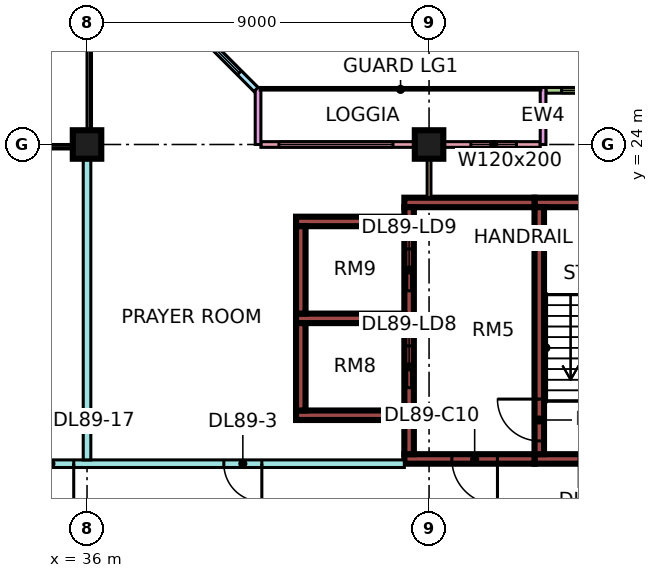
"""IFC4 building model, lengths in metres.
Left out: names, types, materials, properties, quantities, classifications, styles, units other than length and angle.
Written with IfcOpenShell. Run it as: python <this file> out.ifc"""

import sys

from ifc_helpers import new_model, si_unit, direction, frame, frame_2d, origin, origin_2d, place, context, subcontext, project, spatial, rectangle, extrude, element, fill, save


model = new_model("IFC4")
c1 = context("Model", 3, precision=1e-05, world=origin(), true_north=direction((0.0, 1.0)))
c2 = subcontext(c1, "Body", "Model", "MODEL_VIEW")
j1 = project(units=[si_unit("LENGTHUNIT", "METRE"), si_unit("PLANEANGLEUNIT", "RADIAN")], contexts=[c1])
p1 = place(None, origin())
s1 = spatial("IfcSite", under=j1, at=p1, CompositionType="ELEMENT")
p2 = place(p1, origin())
s2 = spatial("IfcBuilding", under=s1, at=p2, CompositionType="ELEMENT")
p3 = place(p2, frame((0.0, 0.0, 380.15)))
s3 = spatial("IfcBuildingStorey", under=s2, at=p3, CompositionType="ELEMENT", Elevation=380.15)
for number, where, z_axis, x_axis in (
    (1, (36.0, 24.0, 0.0), (0.0, 0.0, 1.0), (1.0, 0.0, 0.0)),
    (2, (45.0, 24.0, 0.0), (0.0, 0.0, 1.0), (1.0, 0.0, 0.0)),
):
    element("IfcColumn", number, at=place(p3, frame(where, z_axis=z_axis, x_axis=x_axis)), inside=s3, PredefinedType="COLUMN", context=c2, shape_type="SweptSolid", body=[
        extrude(rectangle(XDim=0.75, YDim=0.75, at=origin_2d()), origin(), (0.0, 0.0, 1.0), 3.75),
    ])
p4 = place(p3, frame((47.775, 15.725, 0.0), z_axis=(0.0, 0.0, 1.0), x_axis=(1.0, 0.0, 0.0)))
e3 = element("IfcWall", 3, at=p4, inside=s3, PredefinedType="SHEAR", context=c2, shape_type="SweptSolid", body=[
    extrude(rectangle(XDim=3.45, YDim=0.25, at=frame_2d((1.725, 0.0))), origin(), (0.0, 0.0, 1.0), 3.75),
])
p5 = place(p4, frame((1.175, 0.0, 0.0)))
e4 = element("IfcOpeningElement", 4, at=p5, cuts=e3, PredefinedType="OPENING", context=c2, shape_type="SweptSolid", body=[
    extrude(rectangle(XDim=1.1, YDim=2.2, at=frame_2d((0.55, 1.1))), frame((0.0, 0.135, 0.0), z_axis=(0.0, -1.0, 0.0), x_axis=(1.0, 0.0, 0.0)), (0.0, 0.0, 1.0), 0.27),
])
p6 = place(p3, frame((47.775, 22.475, 0.0), z_axis=(0.0, 0.0, 1.0), x_axis=(1.0, 0.0, 0.0)))
e5 = element("IfcWall", 5, at=p6, inside=s3, PredefinedType="SHEAR", context=c2, shape_type="SweptSolid", body=[
    extrude(rectangle(XDim=3.45, YDim=0.25, at=frame_2d((1.725, 0.0))), origin(), (0.0, 0.0, 1.0), 3.75),
])
p7 = place(p3, frame((47.9, 15.85, 0.0), z_axis=(0.0, 0.0, 1.0), x_axis=(0.0, 1.0, 0.0)))
e6 = element("IfcWall", 6, at=p7, inside=s3, PredefinedType="SHEAR", context=c2, shape_type="SweptSolid", body=[
    extrude(rectangle(XDim=6.5, YDim=0.25, at=frame_2d((3.25, 0.0))), origin(), (0.0, 0.0, 1.0), 3.75),
])
p8 = place(p7, frame((0.35, 0.0, 0.0)))
e7 = element("IfcOpeningElement", 7, at=p8, cuts=e6, PredefinedType="OPENING", context=c2, shape_type="SweptSolid", body=[
    extrude(rectangle(XDim=1.1, YDim=2.2, at=frame_2d((0.55, 1.1))), frame((0.0, 0.135, 0.0), z_axis=(0.0, -1.0, 0.0), x_axis=(1.0, 0.0, 0.0)), (0.0, 0.0, 1.0), 0.27),
])
p9 = place(p3, frame((44.35, 15.725, 0.0), z_axis=(0.0, 0.0, 1.0), x_axis=(1.0, 0.0, 0.0)))
e8 = element("IfcWall", 8, at=p9, inside=s3, PredefinedType="SHEAR", context=c2, shape_type="SweptSolid", body=[
    extrude(rectangle(XDim=3.425, YDim=0.25, at=frame_2d((1.712, 0.0))), origin(), (0.0, 0.0, 1.0), 3.75),
])
p10 = place(p9, frame((1.25, 0.0, 0.0)))
e9 = element("IfcOpeningElement", 9, at=p10, cuts=e8, PredefinedType="OPENING", context=c2, shape_type="SweptSolid", body=[
    extrude(rectangle(XDim=1.2, YDim=2.2, at=frame_2d((0.6, 1.1))), frame((0.0, 0.135, 0.0), z_axis=(0.0, -1.0, 0.0), x_axis=(1.0, 0.0, 0.0)), (0.0, 0.0, 1.0), 0.27),
])
p11 = place(p3, frame((44.35, 22.475, 0.0), z_axis=(0.0, 0.0, 1.0), x_axis=(1.0, 0.0, 0.0)))
e10 = element("IfcWall", 10, at=p11, inside=s3, PredefinedType="SHEAR", context=c2, shape_type="SweptSolid", body=[
    extrude(rectangle(XDim=3.425, YDim=0.25, at=frame_2d((1.712, 0.0))), origin(), (0.0, 0.0, 1.0), 3.75),
])
p12 = place(p3, frame((44.475, 15.85, 0.0), z_axis=(0.0, 0.0, 1.0), x_axis=(0.0, 1.0, 0.0)))
e11 = element("IfcWall", 11, at=p12, inside=s3, PredefinedType="SHEAR", context=c2, shape_type="SweptSolid", body=[
    extrude(rectangle(XDim=6.5, YDim=0.25, at=frame_2d((3.25, 0.0))), origin(), (0.0, 0.0, 1.0), 3.75),
])
p13 = place(p12, frame((1.75, 0.0, 0.0)))
e12 = element("IfcOpeningElement", 12, at=p13, cuts=e11, PredefinedType="OPENING", context=c2, shape_type="SweptSolid", body=[
    extrude(rectangle(XDim=1.1, YDim=2.2, at=frame_2d((0.55, 1.1))), frame((0.0, 0.135, 0.0), z_axis=(0.0, -1.0, 0.0), x_axis=(1.0, 0.0, 0.0)), (0.0, 0.0, 1.0), 0.27),
])
p14 = place(p12, frame((4.3, 0.0, 0.0)))
e13 = element("IfcOpeningElement", 13, at=p14, cuts=e11, PredefinedType="OPENING", context=c2, shape_type="SweptSolid", body=[
    extrude(rectangle(XDim=1.1, YDim=2.2, at=frame_2d((0.55, 1.1))), frame((0.0, 0.135, 0.0), z_axis=(0.0, -1.0, 0.0), x_axis=(1.0, 0.0, 0.0)), (0.0, 0.0, 1.0), 0.27),
])
for number, where, z_axis, x_axis in (
    (14, (41.5, 16.875, 0.0), (0.0, 0.0, 1.0), (1.0, 0.0, 0.0)),
    (15, (41.5, 19.425, 0.0), (0.0, 0.0, 1.0), (1.0, 0.0, 0.0)),
    (16, (41.5, 21.975, 0.0), (0.0, 0.0, 1.0), (1.0, 0.0, 0.0)),
):
    element("IfcWall", number, at=place(p3, frame(where, z_axis=z_axis, x_axis=x_axis)), inside=s3, PredefinedType="SHEAR", context=c2, shape_type="SweptSolid", body=[
        extrude(rectangle(XDim=2.85, YDim=0.25, at=frame_2d((1.425, 0.0))), origin(), (0.0, 0.0, 1.0), 3.75),
    ])
for number, where, z_axis, x_axis in (
    (17, (41.625, 17.0, 0.0), (0.0, 0.0, 1.0), (0.0, 1.0, 0.0)),
    (18, (41.625, 19.55, 0.0), (0.0, 0.0, 1.0), (0.0, 1.0, 0.0)),
):
    element("IfcWall", number, at=place(p3, frame(where, z_axis=z_axis, x_axis=x_axis)), inside=s3, PredefinedType="SHEAR", context=c2, shape_type="SweptSolid", body=[
        extrude(rectangle(XDim=2.3, YDim=0.25, at=frame_2d((1.15, 0.0))), origin(), (0.0, 0.0, 1.0), 3.75),
    ])
p15 = place(p3, frame((52.5, 25.425, 0.0), z_axis=(0.0, 0.0, 1.0), x_axis=(-1.0, 0.0, 0.0)))
e19 = element("IfcWall", 19, at=p15, inside=s3, PredefinedType="SOLIDWALL", context=c2, shape_type="SweptSolid", body=[
    extrude(rectangle(XDim=4.425, YDim=0.15, at=frame_2d((2.212, 0.0))), origin(), (0.0, 0.0, 1.0), 3.3),
])
p16 = place(p15, frame((0.413, 0.0, 0.45)))
e20 = element("IfcOpeningElement", 20, at=p16, cuts=e19, PredefinedType="OPENING", context=c2, shape_type="SweptSolid", body=[
    extrude(rectangle(XDim=3.6, YDim=2.0, at=frame_2d((1.8, 1.0))), frame((0.0, 0.085, 0.0), z_axis=(0.0, -1.0, 0.0), x_axis=(1.0, 0.0, 0.0)), (0.0, 0.0, 1.0), 0.17),
])
p17 = place(p3, frame((47.925, 24.0, 0.0), z_axis=(0.0, 0.0, 1.0), x_axis=(-1.0, 0.0, 0.0)))
e21 = element("IfcWall", 21, at=p17, inside=s3, PredefinedType="SOLIDWALL", context=c2, shape_type="SweptSolid", body=[
    extrude(rectangle(XDim=7.35, YDim=0.15, at=frame_2d((3.675, 0.0))), origin(), (0.0, 0.0, 1.0), 3.3),
])
p18 = place(p17, frame((0.625, 0.0, 0.45)))
e22 = element("IfcOpeningElement", 22, at=p18, cuts=e21, PredefinedType="OPENING", context=c2, shape_type="SweptSolid", body=[
    extrude(rectangle(XDim=1.2, YDim=2.0, at=frame_2d((0.6, 1.0))), frame((0.0, 0.085, 0.0), z_axis=(0.0, -1.0, 0.0), x_axis=(1.0, 0.0, 0.0)), (0.0, 0.0, 1.0), 0.17),
])
p19 = place(p17, frame((3.875, 0.0, 0.45)))
e23 = element("IfcOpeningElement", 23, at=p19, cuts=e21, PredefinedType="OPENING", context=c2, shape_type="SweptSolid", body=[
    extrude(rectangle(XDim=3.0, YDim=2.0, at=frame_2d((1.5, 1.0))), frame((0.0, 0.085, 0.0), z_axis=(0.0, -1.0, 0.0), x_axis=(1.0, 0.0, 0.0)), (0.0, 0.0, 1.0), 0.17),
])
for number, where, z_axis, x_axis in (
    (24, (48.0, 25.5, 0.0), (0.0, 0.0, 1.0), (0.0, -1.0, 0.0)),
    (25, (40.5, 25.5, 0.0), (0.0, 0.0, 1.0), (0.0, -1.0, 0.0)),
):
    element("IfcWall", number, at=place(p3, frame(where, z_axis=z_axis, x_axis=x_axis)), inside=s3, PredefinedType="SOLIDWALL", context=c2, shape_type="SweptSolid", body=[
        extrude(rectangle(XDim=1.5, YDim=0.15, at=frame_2d((0.75, 0.0))), origin(), (0.0, 0.0, 1.0), 3.3),
    ])
p20 = place(p3, frame((40.447, 25.447, 0.0), z_axis=(0.0, 0.0, 1.0), x_axis=(-0.707106781187, 0.707106781187, 0.0)))
e26 = element("IfcWall", 26, at=p20, inside=s3, PredefinedType="SOLIDWALL", context=c2, shape_type="SweptSolid", body=[
    extrude(rectangle(XDim=4.243, YDim=0.15, at=frame_2d((2.121, 0.0))), origin(), (0.0, 0.0, 1.0), 3.3),
])
p21 = place(p20, frame((0.621, 0.0, 0.45)))
e27 = element("IfcOpeningElement", 27, at=p21, cuts=e26, PredefinedType="OPENING", context=c2, shape_type="SweptSolid", body=[
    extrude(rectangle(XDim=3.0, YDim=2.0, at=frame_2d((1.5, 1.0))), frame((0.0, 0.085, 0.0), z_axis=(0.0, -1.0, 0.0), x_axis=(1.0, 0.0, 0.0)), (0.0, 0.0, 1.0), 0.17),
])
p22 = place(p3, frame((34.0, 15.6, 0.0), z_axis=(0.0, 0.0, 1.0), x_axis=(1.0, 0.0, 0.0)))
e28 = element("IfcWall", 28, at=p22, inside=s3, PredefinedType="PARTITIONING", context=c2, shape_type="SweptSolid", body=[
    extrude(rectangle(XDim=10.35, YDim=0.2, at=frame_2d((5.175, 0.0))), origin(), (0.0, 0.0, 1.0), 3.3),
])
p23 = place(p22, frame((5.6, 0.0, 0.0)))
e29 = element("IfcOpeningElement", 29, at=p23, cuts=e28, PredefinedType="OPENING", context=c2, shape_type="SweptSolid", body=[
    extrude(rectangle(XDim=1.0, YDim=2.1, at=frame_2d((0.5, 1.05))), frame((0.0, 0.11, 0.0), z_axis=(0.0, -1.0, 0.0), x_axis=(1.0, 0.0, 0.0)), (0.0, 0.0, 1.0), 0.22),
])
p24 = place(p22, frame((0.45, 0.0, 0.0)))
e30 = element("IfcOpeningElement", 30, at=p24, cuts=e28, PredefinedType="OPENING", context=c2, shape_type="SweptSolid", body=[
    extrude(rectangle(XDim=1.2, YDim=2.1, at=frame_2d((0.6, 1.05))), frame((0.0, 0.11, 0.0), z_axis=(0.0, -1.0, 0.0), x_axis=(1.0, 0.0, 0.0)), (0.0, 0.0, 1.0), 0.22),
])
p25 = place(p3, frame((36.0, 15.7, 0.0), z_axis=(0.0, 0.0, 1.0), x_axis=(0.0, 1.0, 0.0)))
e31 = element("IfcWall", 31, at=p25, inside=s3, PredefinedType="PARTITIONING", context=c2, shape_type="SweptSolid", body=[
    extrude(rectangle(XDim=8.3, YDim=0.2, at=frame_2d((4.15, 0.0))), origin(), (0.0, 0.0, 1.0), 3.3),
])
p26 = place(p3, frame((45.0, 22.6, 0.0), z_axis=(0.0, 0.0, 1.0), x_axis=(0.0, 1.0, 0.0)))
e32 = element("IfcWall", 32, at=p26, inside=s3, PredefinedType="PARTITIONING", context=c2, shape_type="SweptSolid", body=[
    extrude(rectangle(XDim=1.326, YDim=0.1, at=frame_2d((0.663, 0.0))), origin(), (0.0, 0.0, 1.0), 3.3),
])
p27 = place(p16, origin())
e33 = element("IfcWindow", 33, at=p27, inside=s3, PartitioningType="SINGLE_PANEL", PredefinedType="WINDOW", context=c2, shape_type="SweptSolid", body=[
    extrude(rectangle(XDim=3.6, YDim=2.0, at=frame_2d((1.8, 1.0))), frame((0.0, 0.03, 0.0), z_axis=(0.0, -1.0, 0.0), x_axis=(1.0, 0.0, 0.0)), (0.0, 0.0, 1.0), 0.06),
])
fill(e20, e33)
p28 = place(p18, origin())
e34 = element("IfcWindow", 34, at=p28, inside=s3, PartitioningType="SINGLE_PANEL", PredefinedType="WINDOW", context=c2, shape_type="SweptSolid", body=[
    extrude(rectangle(XDim=1.2, YDim=2.0, at=frame_2d((0.6, 1.0))), frame((0.0, 0.03, 0.0), z_axis=(0.0, -1.0, 0.0), x_axis=(1.0, 0.0, 0.0)), (0.0, 0.0, 1.0), 0.06),
])
fill(e22, e34)
p29 = place(p19, origin())
e35 = element("IfcWindow", 35, at=p29, inside=s3, PartitioningType="SINGLE_PANEL", PredefinedType="WINDOW", context=c2, shape_type="SweptSolid", body=[
    extrude(rectangle(XDim=3.0, YDim=2.0, at=frame_2d((1.5, 1.0))), frame((0.0, 0.03, 0.0), z_axis=(0.0, -1.0, 0.0), x_axis=(1.0, 0.0, 0.0)), (0.0, 0.0, 1.0), 0.06),
])
fill(e23, e35)
p30 = place(p21, origin())
e36 = element("IfcWindow", 36, at=p30, inside=s3, PartitioningType="SINGLE_PANEL", PredefinedType="WINDOW", context=c2, shape_type="SweptSolid", body=[
    extrude(rectangle(XDim=3.0, YDim=2.0, at=frame_2d((1.5, 1.0))), frame((0.0, 0.03, 0.0), z_axis=(0.0, -1.0, 0.0), x_axis=(1.0, 0.0, 0.0)), (0.0, 0.0, 1.0), 0.06),
])
fill(e27, e36)
p31 = place(p10, origin())
e37 = element("IfcDoor", 37, at=p31, inside=s3, OperationType="SINGLE_SWING_RIGHT", PredefinedType="DOOR", context=c2, shape_type="SweptSolid", body=[
    extrude(rectangle(XDim=1.2, YDim=2.2, at=frame_2d((0.6, 1.1))), frame((0.0, 0.025, 0.0), z_axis=(0.0, -1.0, 0.0), x_axis=(1.0, 0.0, 0.0)), (0.0, 0.0, 1.0), 0.05),
])
fill(e9, e37)
p32 = place(p8, frame((1.1, 0.0, 0.0), z_axis=(0.0, 0.0, 1.0), x_axis=(-1.0, 0.0, 0.0)))
e38 = element("IfcDoor", 38, at=p32, inside=s3, OperationType="SINGLE_SWING_RIGHT", PredefinedType="DOOR", context=c2, shape_type="SweptSolid", body=[
    extrude(rectangle(XDim=1.1, YDim=2.2, at=frame_2d((0.55, 1.1))), frame((0.0, 0.025, 0.0), z_axis=(0.0, -1.0, 0.0), x_axis=(1.0, 0.0, 0.0)), (0.0, 0.0, 1.0), 0.05),
])
fill(e7, e38)
p33 = place(p13, origin())
e39 = element("IfcDoor", 39, at=p33, inside=s3, OperationType="DOUBLE_DOOR_SLIDING", PredefinedType="DOOR", context=c2, shape_type="SweptSolid", body=[
    extrude(rectangle(XDim=1.1, YDim=2.2, at=frame_2d((0.55, 1.1))), frame((0.0, 0.025, 0.0), z_axis=(0.0, -1.0, 0.0), x_axis=(1.0, 0.0, 0.0)), (0.0, 0.0, 1.0), 0.05),
])
fill(e12, e39)
p34 = place(p14, origin())
e40 = element("IfcDoor", 40, at=p34, inside=s3, OperationType="DOUBLE_DOOR_SLIDING", PredefinedType="DOOR", context=c2, shape_type="SweptSolid", body=[
    extrude(rectangle(XDim=1.1, YDim=2.2, at=frame_2d((0.55, 1.1))), frame((0.0, 0.025, 0.0), z_axis=(0.0, -1.0, 0.0), x_axis=(1.0, 0.0, 0.0)), (0.0, 0.0, 1.0), 0.05),
])
fill(e13, e40)
p35 = place(p23, origin())
e41 = element("IfcDoor", 41, at=p35, inside=s3, OperationType="SINGLE_SWING_RIGHT", PredefinedType="DOOR", context=c2, shape_type="SweptSolid", body=[
    extrude(rectangle(XDim=1.0, YDim=2.1, at=frame_2d((0.5, 1.05))), frame((0.0, 0.025, 0.0), z_axis=(0.0, -1.0, 0.0), x_axis=(1.0, 0.0, 0.0)), (0.0, 0.0, 1.0), 0.05),
])
fill(e29, e41)
p36 = place(p24, origin())
e42 = element("IfcDoor", 42, at=p36, inside=s3, OperationType="SINGLE_SWING_RIGHT", PredefinedType="DOOR", context=c2, shape_type="SweptSolid", body=[
    extrude(rectangle(XDim=1.2, YDim=2.1, at=frame_2d((0.6, 1.05))), frame((0.0, 0.025, 0.0), z_axis=(0.0, -1.0, 0.0), x_axis=(1.0, 0.0, 0.0)), (0.0, 0.0, 1.0), 0.05),
])
fill(e30, e42)
save(model, sys.argv[1])
